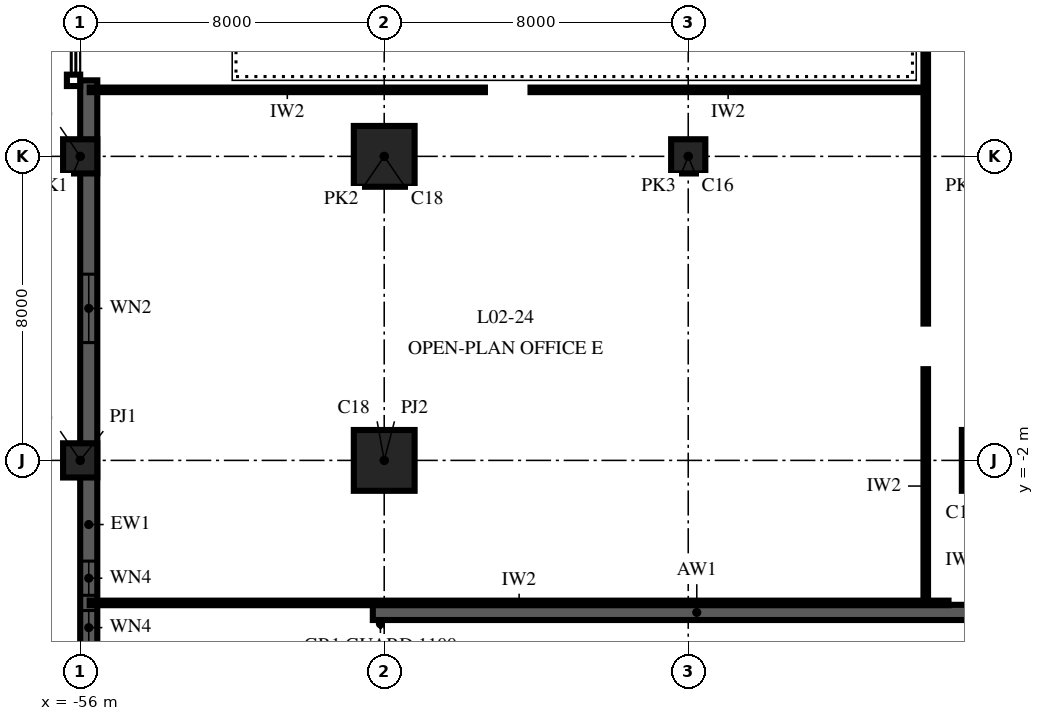
"""IFC4 building model, lengths in metres.
Left out: names, types, materials, properties, quantities, classifications, styles, units other than length and angle.
Written with IfcOpenShell. Run it as: python <this file> out.ifc"""

import sys

from ifc_helpers import new_model, si_unit, direction, frame, frame_2d, origin, origin_2d, place, context, subcontext, project, spatial, rectangle, extrude, element, fill, save


model = new_model("IFC4")
c1 = context("Model", 3, precision=1e-05, world=origin(), true_north=direction((0.0, 1.0)))
c2 = subcontext(c1, "Body", "Model", "MODEL_VIEW")
j1 = project(units=[si_unit("LENGTHUNIT", "METRE"), si_unit("PLANEANGLEUNIT", "RADIAN")], contexts=[c1])
p1 = place(None, origin())
s1 = spatial("IfcSite", under=j1, at=p1, CompositionType="ELEMENT")
p2 = place(p1, origin())
s2 = spatial("IfcBuilding", under=s1, at=p2, CompositionType="ELEMENT")
p3 = place(p2, frame((0.0, 0.0, 12.0)))
s3 = spatial("IfcBuildingStorey", under=s2, at=p3, CompositionType="ELEMENT", Elevation=12.0)
for number, where, z_axis, x_axis in (
    (1, (-56.0, -2.0, 0.0), (0.0, 0.0, 1.0), (1.0, 0.0, 0.0)),
    (2, (-56.0, 6.0, 0.0), (0.0, 0.0, 1.0), (1.0, 0.0, 0.0)),
):
    element("IfcColumn", number, at=place(p3, frame(where, z_axis=z_axis, x_axis=x_axis)), inside=s3, PredefinedType="COLUMN", context=c2, shape_type="SweptSolid", body=[
        extrude(rectangle(XDim=0.9, YDim=0.9, at=origin_2d()), origin(), (0.0, 0.0, 1.0), 7.0),
    ])
for number, where, z_axis, x_axis in (
    (3, (-48.0, -2.0, 0.0), (0.0, 0.0, 1.0), (1.0, 0.0, 0.0)),
    (4, (-48.0, 6.0, 0.0), (0.0, 0.0, 1.0), (1.0, 0.0, 0.0)),
):
    element("IfcColumn", number, at=place(p3, frame(where, z_axis=z_axis, x_axis=x_axis)), inside=s3, PredefinedType="COLUMN", context=c2, shape_type="SweptSolid", body=[
        extrude(rectangle(XDim=1.6, YDim=1.6, at=origin_2d()), origin(), (0.0, 0.0, 1.0), 7.0),
    ])
p4 = place(p3, frame((-40.0, 6.0, 0.0), z_axis=(0.0, 0.0, 1.0), x_axis=(1.0, 0.0, 0.0)))
e5 = element("IfcColumn", 5, at=p4, inside=s3, PredefinedType="COLUMN", context=c2, shape_type="SweptSolid", body=[
    extrude(rectangle(XDim=0.9, YDim=0.9, at=origin_2d()), origin(), (0.0, 0.0, 1.0), 7.0),
])
p5 = place(p3, frame((-32.0, -2.0, 0.0), z_axis=(0.0, 0.0, 1.0), x_axis=(1.0, 0.0, 0.0)))
e6 = element("IfcColumn", 6, at=p5, inside=s3, PredefinedType="COLUMN", context=c2, shape_type="SweptSolid", body=[
    extrude(rectangle(XDim=1.6, YDim=1.6, at=origin_2d()), origin(), (0.0, 0.0, 1.0), 7.0),
])
p6 = place(p3, frame((-48.3, -6.0, 0.0), z_axis=(0.0, 0.0, 1.0), x_axis=(1.0, 0.0, 0.0)))
e7 = element("IfcWall", 7, at=p6, inside=s3, PredefinedType="SHEAR", context=c2, shape_type="SweptSolid", body=[
    extrude(rectangle(XDim=17.05, YDim=0.4, at=frame_2d((8.525, 0.0))), origin(), (0.0, 0.0, 1.0), 7.0),
])
p7 = place(p3, frame((-55.775, 8.0, 0.0), z_axis=(0.0, 0.0, 1.0), x_axis=(0.0, -1.0, 0.0)))
e8 = element("IfcWall", 8, at=p7, inside=s3, PredefinedType="SOLIDWALL", context=c2, shape_type="SweptSolid", body=[
    extrude(rectangle(XDim=81.55, YDim=0.45, at=frame_2d((40.775, 0.0))), origin(), (0.0, 0.0, 1.0), 7.0),
])
p8 = place(p7, frame((5.1, 0.0, 1.0)))
e9 = element("IfcOpeningElement", 9, at=p8, cuts=e8, PredefinedType="OPENING", context=c2, shape_type="SweptSolid", body=[
    extrude(rectangle(XDim=1.8, YDim=3.0, at=frame_2d((0.9, 1.5))), frame((0.0, 0.24, 0.0), z_axis=(0.0, -1.0, 0.0), x_axis=(1.0, 0.0, 0.0)), (0.0, 0.0, 1.0), 0.48),
])
p9 = place(p7, frame((12.65, 0.0, 1.0)))
e10 = element("IfcOpeningElement", 10, at=p9, cuts=e8, PredefinedType="OPENING", context=c2, shape_type="SweptSolid", body=[
    extrude(rectangle(XDim=0.9, YDim=3.0, at=frame_2d((0.45, 1.5))), frame((0.0, 0.24, 0.0), z_axis=(0.0, -1.0, 0.0), x_axis=(1.0, 0.0, 0.0)), (0.0, 0.0, 1.0), 0.48),
])
p10 = place(p7, frame((13.95, 0.0, 1.0)))
e11 = element("IfcOpeningElement", 11, at=p10, cuts=e8, PredefinedType="OPENING", context=c2, shape_type="SweptSolid", body=[
    extrude(rectangle(XDim=0.9, YDim=3.0, at=frame_2d((0.45, 1.5))), frame((0.0, 0.24, 0.0), z_axis=(0.0, -1.0, 0.0), x_axis=(1.0, 0.0, 0.0)), (0.0, 0.0, 1.0), 0.48),
])
p11 = place(p7, frame((20.9, 0.0, 1.0)))
e12 = element("IfcOpeningElement", 12, at=p11, cuts=e8, PredefinedType="OPENING", context=c2, shape_type="SweptSolid", body=[
    extrude(rectangle(XDim=0.9, YDim=3.0, at=frame_2d((0.45, 1.5))), frame((0.0, 0.24, 0.0), z_axis=(0.0, -1.0, 0.0), x_axis=(1.0, 0.0, 0.0)), (0.0, 0.0, 1.0), 0.48),
])
p12 = place(p7, frame((22.2, 0.0, 1.0)))
e13 = element("IfcOpeningElement", 13, at=p12, cuts=e8, PredefinedType="OPENING", context=c2, shape_type="SweptSolid", body=[
    extrude(rectangle(XDim=0.9, YDim=3.0, at=frame_2d((0.45, 1.5))), frame((0.0, 0.24, 0.0), z_axis=(0.0, -1.0, 0.0), x_axis=(1.0, 0.0, 0.0)), (0.0, 0.0, 1.0), 0.48),
])
p13 = place(p7, frame((29.1, 0.0, 1.0)))
e14 = element("IfcOpeningElement", 14, at=p13, cuts=e8, PredefinedType="OPENING", context=c2, shape_type="SweptSolid", body=[
    extrude(rectangle(XDim=1.8, YDim=3.0, at=frame_2d((0.9, 1.5))), frame((0.0, 0.24, 0.0), z_axis=(0.0, -1.0, 0.0), x_axis=(1.0, 0.0, 0.0)), (0.0, 0.0, 1.0), 0.48),
])
p14 = place(p7, frame((37.1, 0.0, 1.0)))
e15 = element("IfcOpeningElement", 15, at=p14, cuts=e8, PredefinedType="OPENING", context=c2, shape_type="SweptSolid", body=[
    extrude(rectangle(XDim=1.8, YDim=3.0, at=frame_2d((0.9, 1.5))), frame((0.0, 0.24, 0.0), z_axis=(0.0, -1.0, 0.0), x_axis=(1.0, 0.0, 0.0)), (0.0, 0.0, 1.0), 0.48),
])
p15 = place(p7, frame((45.1, 0.0, 1.0)))
e16 = element("IfcOpeningElement", 16, at=p15, cuts=e8, PredefinedType="OPENING", context=c2, shape_type="SweptSolid", body=[
    extrude(rectangle(XDim=1.8, YDim=3.0, at=frame_2d((0.9, 1.5))), frame((0.0, 0.24, 0.0), z_axis=(0.0, -1.0, 0.0), x_axis=(1.0, 0.0, 0.0)), (0.0, 0.0, 1.0), 0.48),
])
p16 = place(p7, frame((53.1, 0.0, 1.0)))
e17 = element("IfcOpeningElement", 17, at=p16, cuts=e8, PredefinedType="OPENING", context=c2, shape_type="SweptSolid", body=[
    extrude(rectangle(XDim=1.8, YDim=3.0, at=frame_2d((0.9, 1.5))), frame((0.0, 0.24, 0.0), z_axis=(0.0, -1.0, 0.0), x_axis=(1.0, 0.0, 0.0)), (0.0, 0.0, 1.0), 0.48),
])
p17 = place(p7, frame((61.1, 0.0, 1.0)))
e18 = element("IfcOpeningElement", 18, at=p17, cuts=e8, PredefinedType="OPENING", context=c2, shape_type="SweptSolid", body=[
    extrude(rectangle(XDim=1.8, YDim=3.0, at=frame_2d((0.9, 1.5))), frame((0.0, 0.24, 0.0), z_axis=(0.0, -1.0, 0.0), x_axis=(1.0, 0.0, 0.0)), (0.0, 0.0, 1.0), 0.48),
])
p18 = place(p7, frame((69.1, 0.0, 1.0)))
e19 = element("IfcOpeningElement", 19, at=p18, cuts=e8, PredefinedType="OPENING", context=c2, shape_type="SweptSolid", body=[
    extrude(rectangle(XDim=1.8, YDim=3.0, at=frame_2d((0.9, 1.5))), frame((0.0, 0.24, 0.0), z_axis=(0.0, -1.0, 0.0), x_axis=(1.0, 0.0, 0.0)), (0.0, 0.0, 1.0), 0.48),
])
p19 = place(p7, frame((76.875, 0.0, 1.0)))
e20 = element("IfcOpeningElement", 20, at=p19, cuts=e8, PredefinedType="OPENING", context=c2, shape_type="SweptSolid", body=[
    extrude(rectangle(XDim=1.8, YDim=3.0, at=frame_2d((0.9, 1.5))), frame((0.0, 0.24, 0.0), z_axis=(0.0, -1.0, 0.0), x_axis=(1.0, 0.0, 0.0)), (0.0, 0.0, 1.0), 0.48),
])
p20 = place(p3, frame((-33.75, -5.75, 0.0), z_axis=(0.0, 0.0, 1.0), x_axis=(0.0, 1.0, 0.0)))
e21 = element("IfcWall", 21, at=p20, inside=s3, PredefinedType="PARTITIONING", context=c2, shape_type="SweptSolid", body=[
    extrude(rectangle(XDim=6.15, YDim=0.12, at=frame_2d((3.075, 0.0))), origin(), (0.0, 0.0, 1.0), 6.7),
])
p21 = place(p3, frame((-33.75, 1.6, 0.0), z_axis=(0.0, 0.0, 1.0), x_axis=(0.0, 1.0, 0.0)))
e22 = element("IfcWall", 22, at=p21, inside=s3, PredefinedType="PARTITIONING", context=c2, shape_type="SweptSolid", body=[
    extrude(rectangle(XDim=28.15, YDim=0.12, at=frame_2d((14.075, 0.0))), origin(), (0.0, 0.0, 1.0), 6.7),
])
p22 = place(p3, frame((-55.75, -5.75, 0.0), z_axis=(0.0, 0.0, 1.0), x_axis=(1.0, 0.0, 0.0)))
e23 = element("IfcWall", 23, at=p22, inside=s3, PredefinedType="PARTITIONING", context=c2, shape_type="SweptSolid", body=[
    extrude(rectangle(XDim=22.6, YDim=0.12, at=frame_2d((11.3, 0.0))), origin(), (0.0, 0.0, 1.0), 6.7),
])
for number, where, z_axis, x_axis in (
    (24, (-55.75, 7.75, 0.0), (0.0, 0.0, 1.0), (1.0, 0.0, 0.0)),
    (25, (-44.15, 7.75, 0.0), (0.0, 0.0, 1.0), (1.0, 0.0, 0.0)),
):
    element("IfcWall", number, at=place(p3, frame(where, z_axis=z_axis, x_axis=x_axis)), inside=s3, PredefinedType="PARTITIONING", context=c2, shape_type="SweptSolid", body=[
        extrude(rectangle(XDim=10.4, YDim=0.12, at=frame_2d((5.2, 0.0))), origin(), (0.0, 0.0, 1.0), 6.7),
    ])
p23 = place(p8, origin())
e26 = element("IfcWindow", 26, at=p23, inside=s3, PartitioningType="SINGLE_PANEL", PredefinedType="WINDOW", context=c2, shape_type="SweptSolid", body=[
    extrude(rectangle(XDim=1.8, YDim=3.0, at=frame_2d((0.9, 1.5))), frame((0.0, 0.03, 0.0), z_axis=(0.0, -1.0, 0.0), x_axis=(1.0, 0.0, 0.0)), (0.0, 0.0, 1.0), 0.06),
])
fill(e9, e26)
p24 = place(p9, origin())
e27 = element("IfcWindow", 27, at=p24, inside=s3, PartitioningType="SINGLE_PANEL", PredefinedType="WINDOW", context=c2, shape_type="SweptSolid", body=[
    extrude(rectangle(XDim=0.9, YDim=3.0, at=frame_2d((0.45, 1.5))), frame((0.0, 0.03, 0.0), z_axis=(0.0, -1.0, 0.0), x_axis=(1.0, 0.0, 0.0)), (0.0, 0.0, 1.0), 0.06),
])
fill(e10, e27)
p25 = place(p10, origin())
e28 = element("IfcWindow", 28, at=p25, inside=s3, PartitioningType="SINGLE_PANEL", PredefinedType="WINDOW", context=c2, shape_type="SweptSolid", body=[
    extrude(rectangle(XDim=0.9, YDim=3.0, at=frame_2d((0.45, 1.5))), frame((0.0, 0.03, 0.0), z_axis=(0.0, -1.0, 0.0), x_axis=(1.0, 0.0, 0.0)), (0.0, 0.0, 1.0), 0.06),
])
fill(e11, e28)
save(model, sys.argv[1])
